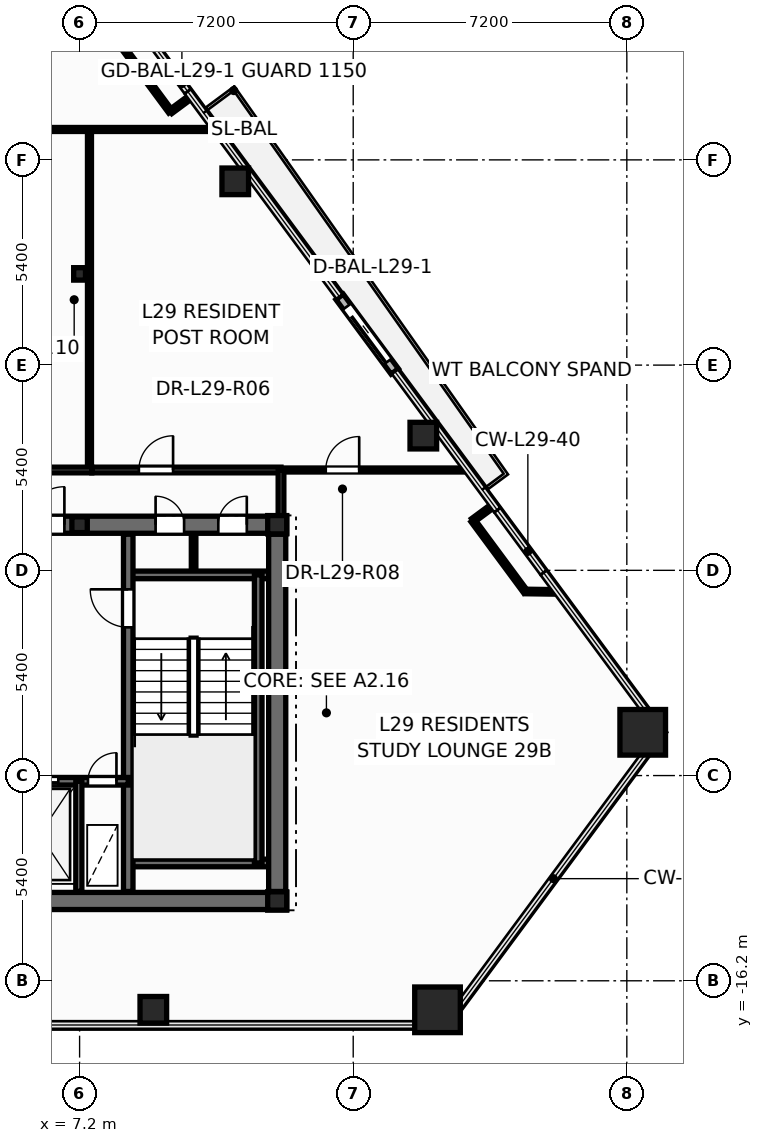
"""IFC4 building model, lengths in metres.
Left out: names, types, materials, properties, quantities, classifications, styles, units other than length and angle.
Written with IfcOpenShell. Run it as: python <this file> out.ifc"""

import sys

from ifc_helpers import new_model, si_unit, direction, frame, frame_2d, origin, origin_2d, place, context, subcontext, project, spatial, rectangle, hollow_rectangle, hollow_circle, i_section, extrude, element, fill, save


model = new_model("IFC4")
c1 = context("Model", 3, precision=1e-05, world=origin(), true_north=direction((0.0, 1.0)))
c2 = subcontext(c1, "Body", "Model", "MODEL_VIEW")
j1 = project(units=[si_unit("LENGTHUNIT", "METRE"), si_unit("PLANEANGLEUNIT", "RADIAN")], contexts=[c1])
p1 = place(None, origin())
s1 = spatial("IfcSite", under=j1, at=p1, CompositionType="ELEMENT")
p2 = place(p1, origin())
s2 = spatial("IfcBuilding", under=s1, at=p2, CompositionType="ELEMENT")
p3 = place(p2, frame((0.0, 0.0, 114.0)))
s3 = spatial("IfcBuildingStorey", under=s2, at=p3, CompositionType="ELEMENT", Elevation=114.0)
for number, where, z_axis, x_axis in (
    (1, (16.618, -16.963, 0.0), (0.0, 0.0, 1.0), (1.0, 0.0, 0.0)),
    (2, (22.019, -9.662, 0.0), (0.0, 0.0, 1.0), (1.0, 0.0, 0.0)),
):
    element("IfcColumn", number, at=place(p3, frame(where, z_axis=z_axis, x_axis=x_axis)), inside=s3, PredefinedType="COLUMN", context=c2, shape_type="SweptSolid", body=[
        extrude(hollow_rectangle(XDim=1.2, YDim=1.2, WallThickness=0.055, at=origin_2d()), origin(), (0.0, 0.0, 1.0), 3.6),
    ])
for number, where, z_axis, x_axis in (
    (3, (9.14, -16.963, 0.0), (0.0, 0.0, 1.0), (1.0, 0.0, 0.0)),
    (4, (16.245, -1.856, 0.0), (0.0, 0.0, 1.0), (1.0, 0.0, 0.0)),
    (5, (11.296, 4.836, 0.0), (0.0, 0.0, 1.0), (1.0, 0.0, 0.0)),
):
    element("IfcColumn", number, at=place(p3, frame(where, z_axis=z_axis, x_axis=x_axis)), inside=s3, PredefinedType="COLUMN", context=c2, shape_type="SweptSolid", body=[
        extrude(hollow_circle(Radius=0.35, WallThickness=0.03, at=origin_2d()), origin(), (0.0, 0.0, 1.0), 3.6),
    ])
for number, where, z_axis, x_axis in (
    (6, (12.4, -14.1, 0.0), (0.0, 0.0, 1.0), (1.0, 0.0, 0.0)),
    (7, (12.4, -4.2, 0.0), (0.0, 0.0, 1.0), (1.0, 0.0, 0.0)),
):
    element("IfcColumn", number, at=place(p3, frame(where, z_axis=z_axis, x_axis=x_axis)), inside=s3, PredefinedType="COLUMN", context=c2, shape_type="SweptSolid", body=[
        extrude(i_section(OverallWidth=0.5, OverallDepth=0.482, WebThickness=0.04, FlangeThickness=0.045, at=origin_2d()), origin(), (0.0, 0.0, 1.0), 3.6),
    ])
p4 = place(p3, frame((7.2, -4.2, 0.0), z_axis=(0.0, 0.0, 1.0), x_axis=(1.0, 0.0, 0.0)))
e8 = element("IfcColumn", 8, at=p4, inside=s3, PredefinedType="PILASTER", context=c2, shape_type="SweptSolid", body=[
    extrude(i_section(OverallWidth=0.405, OverallDepth=0.414, WebThickness=0.022, FlangeThickness=0.032, at=origin_2d()), origin(), (0.0, 0.0, 1.0), 3.6),
])
p5 = place(p3, frame((7.2, 2.4, 0.0), z_axis=(0.0, 0.0, 1.0), x_axis=(1.0, 0.0, 0.0)))
e9 = element("IfcColumn", 9, at=p5, inside=s3, PredefinedType="COLUMN", context=c2, shape_type="SweptSolid", body=[
    extrude(i_section(OverallWidth=0.311, OverallDepth=0.327, WebThickness=0.016, FlangeThickness=0.025, at=origin_2d()), origin(), (0.0, 0.0, 1.0), 3.6),
])
p6 = place(p3, frame((15.493, -0.166, -0.015), z_axis=(0.0, 0.0, 1.0), x_axis=(-0.594655490218, 0.803980626603, 0.0)))
e10 = element("IfcWall", 10, at=p6, inside=s3, PredefinedType="STANDARD", context=c2, shape_type="SweptSolid", body=[
    extrude(rectangle(XDim=2.44, YDim=0.24, at=frame_2d((1.22, 0.0))), origin(), (0.0, 0.0, 1.0), 2.777),
])
p7 = place(p6, frame((0.32, 0.0, 0.015)))
e11 = element("IfcOpeningElement", 11, at=p7, cuts=e10, PredefinedType="OPENING", context=c2, shape_type="SweptSolid", body=[
    extrude(rectangle(XDim=1.806, YDim=2.204, at=frame_2d((0.9, 1.102))), frame((0.0, 0.13, 0.0), z_axis=(0.0, -1.0, 0.0), x_axis=(1.0, 0.0, 0.0)), (0.0, 0.0, 1.0), 0.26),
])
p8 = place(p3, frame((10.2, -5.52, 0.0), z_axis=(0.0, 0.0, 1.0), x_axis=(0.0, 1.0, 0.0)))
e12 = element("IfcWall", 12, at=p8, inside=s3, PredefinedType="PARTITIONING", context=c2, shape_type="SweptSolid", body=[
    extrude(rectangle(XDim=1.12, YDim=0.12, at=frame_2d((0.56, 0.0))), origin(), (0.0, 0.0, 1.0), 3.32),
])
p9 = place(p3, frame((-12.65, -14.1, 0.0), z_axis=(0.0, 0.0, 1.0), x_axis=(1.0, 0.0, 0.0)))
e13 = element("IfcWall", 13, at=p9, inside=s3, PredefinedType="SHEAR", context=c2, shape_type="SweptSolid", body=[
    extrude(rectangle(XDim=25.3, YDim=0.45, at=frame_2d((12.65, 0.0))), origin(), (0.0, 0.0, 1.0), 3.6),
])
p10 = place(p3, frame((-12.65, -4.2, 0.0), z_axis=(0.0, 0.0, 1.0), x_axis=(1.0, 0.0, 0.0)))
e14 = element("IfcWall", 14, at=p10, inside=s3, PredefinedType="SHEAR", context=c2, shape_type="SweptSolid", body=[
    extrude(rectangle(XDim=25.3, YDim=0.45, at=frame_2d((12.65, 0.0))), origin(), (0.0, 0.0, 1.0), 3.6),
])
p11 = place(p10, frame((0.95, 0.0, 0.0)))
e15 = element("IfcOpeningElement", 15, at=p11, cuts=e14, PredefinedType="OPENING", context=c2, shape_type="SweptSolid", body=[
    extrude(rectangle(XDim=0.756, YDim=2.054, at=frame_2d((0.375, 1.027))), frame((0.0, 0.235, 0.0), z_axis=(0.0, -1.0, 0.0), x_axis=(1.0, 0.0, 0.0)), (0.0, 0.0, 1.0), 0.47),
])
p12 = place(p10, frame((2.6, 0.0, 0.0)))
e16 = element("IfcOpeningElement", 16, at=p12, cuts=e14, PredefinedType="OPENING", context=c2, shape_type="SweptSolid", body=[
    extrude(rectangle(XDim=0.756, YDim=2.054, at=frame_2d((0.375, 1.027))), frame((0.0, 0.235, 0.0), z_axis=(0.0, -1.0, 0.0), x_axis=(1.0, 0.0, 0.0)), (0.0, 0.0, 1.0), 0.47),
])
p13 = place(p10, frame((21.85, 0.0, 0.0)))
e17 = element("IfcOpeningElement", 17, at=p13, cuts=e14, PredefinedType="OPENING", context=c2, shape_type="SweptSolid", body=[
    extrude(rectangle(XDim=0.756, YDim=2.054, at=frame_2d((0.375, 1.027))), frame((0.0, 0.235, 0.0), z_axis=(0.0, -1.0, 0.0), x_axis=(1.0, 0.0, 0.0)), (0.0, 0.0, 1.0), 0.47),
])
p14 = place(p10, frame((23.5, 0.0, 0.0)))
e18 = element("IfcOpeningElement", 18, at=p14, cuts=e14, PredefinedType="OPENING", context=c2, shape_type="SweptSolid", body=[
    extrude(rectangle(XDim=0.756, YDim=2.054, at=frame_2d((0.375, 1.027))), frame((0.0, 0.235, 0.0), z_axis=(0.0, -1.0, 0.0), x_axis=(1.0, 0.0, 0.0)), (0.0, 0.0, 1.0), 0.47),
])
p15 = place(p10, frame((5.85, 0.0, 0.0)))
e19 = element("IfcOpeningElement", 19, at=p15, cuts=e14, PredefinedType="OPENING", context=c2, shape_type="SweptSolid", body=[
    extrude(rectangle(XDim=1.006, YDim=2.104, at=frame_2d((0.5, 1.052))), frame((0.0, 0.235, 0.0), z_axis=(0.0, -1.0, 0.0), x_axis=(1.0, 0.0, 0.0)), (0.0, 0.0, 1.0), 0.47),
])
p16 = place(p10, frame((10.35, 0.0, 0.0)))
e20 = element("IfcOpeningElement", 20, at=p16, cuts=e14, PredefinedType="OPENING", context=c2, shape_type="SweptSolid", body=[
    extrude(rectangle(XDim=1.406, YDim=2.154, at=frame_2d((0.7, 1.077))), frame((0.0, 0.235, 0.0), z_axis=(0.0, -1.0, 0.0), x_axis=(1.0, 0.0, 0.0)), (0.0, 0.0, 1.0), 0.47),
])
p17 = place(p10, frame((18.45, 0.0, 0.0)))
e21 = element("IfcOpeningElement", 21, at=p17, cuts=e14, PredefinedType="OPENING", context=c2, shape_type="SweptSolid", body=[
    extrude(rectangle(XDim=1.006, YDim=2.104, at=frame_2d((0.5, 1.052))), frame((0.0, 0.235, 0.0), z_axis=(0.0, -1.0, 0.0), x_axis=(1.0, 0.0, 0.0)), (0.0, 0.0, 1.0), 0.47),
])
for number, where, z_axis, x_axis in (
    (22, (8.48, -5.52, 0.0), (0.0, 0.0, 1.0), (1.0, 0.0, 0.0)),
    (23, (8.48, -13.1, 0.0), (0.0, 0.0, 1.0), (1.0, 0.0, 0.0)),
):
    element("IfcWall", number, at=place(p3, frame(where, z_axis=z_axis, x_axis=x_axis)), inside=s3, PredefinedType="SOLIDWALL", context=c2, shape_type="SweptSolid", body=[
        extrude(rectangle(XDim=3.87, YDim=0.2, at=frame_2d((1.935, 0.0))), origin(), (0.0, 0.0, 1.0), 3.6),
    ])
p18 = place(p3, frame((11.9, -13.1, 0.0), z_axis=(0.0, 0.0, 1.0), x_axis=(0.0, 1.0, 0.0)))
e24 = element("IfcWall", 24, at=p18, inside=s3, PredefinedType="SOLIDWALL", context=c2, shape_type="SweptSolid", body=[
    extrude(rectangle(XDim=7.58, YDim=0.2, at=frame_2d((3.79, 0.0))), origin(), (0.0, 0.0, 1.0), 3.6),
])
p19 = place(p3, frame((8.48, -13.85, 0.0), z_axis=(0.0, 0.0, 1.0), x_axis=(0.0, 1.0, 0.0)))
e25 = element("IfcWall", 25, at=p19, inside=s3, PredefinedType="SHEAR", context=c2, shape_type="SweptSolid", body=[
    extrude(rectangle(XDim=9.4, YDim=0.25, at=frame_2d((4.7, 0.0))), origin(), (0.0, 0.0, 1.0), 3.6),
])
p20 = place(p19, frame((6.95, 0.0, 0.0)))
e26 = element("IfcOpeningElement", 26, at=p20, cuts=e25, PredefinedType="OPENING", context=c2, shape_type="SweptSolid", body=[
    extrude(rectangle(XDim=1.006, YDim=2.104, at=frame_2d((0.5, 1.052))), frame((0.0, 0.135, 0.0), z_axis=(0.0, -1.0, 0.0), x_axis=(1.0, 0.0, 0.0)), (0.0, 0.0, 1.0), 0.27),
])
p21 = place(p3, frame((5.12, -10.95, 0.0), z_axis=(0.0, 0.0, 1.0), x_axis=(1.0, 0.0, 0.0)))
e27 = element("IfcWall", 27, at=p21, inside=s3, PredefinedType="SOLIDWALL", context=c2, shape_type="SweptSolid", body=[
    extrude(rectangle(XDim=3.36, YDim=0.2, at=frame_2d((1.68, 0.0))), origin(), (0.0, 0.0, 1.0), 3.6),
])
p22 = place(p21, frame((0.42, 0.0, 0.0)))
e28 = element("IfcOpeningElement", 28, at=p22, cuts=e27, PredefinedType="OPENING", context=c2, shape_type="SweptSolid", body=[
    extrude(rectangle(XDim=1.106, YDim=2.104, at=frame_2d((0.55, 1.052))), frame((0.0, 0.11, 0.0), z_axis=(0.0, -1.0, 0.0), x_axis=(1.0, 0.0, 0.0)), (0.0, 0.0, 1.0), 0.22),
])
p23 = place(p21, frame((2.3, 0.0, 0.0)))
e29 = element("IfcOpeningElement", 29, at=p23, cuts=e27, PredefinedType="OPENING", context=c2, shape_type="SweptSolid", body=[
    extrude(rectangle(XDim=0.756, YDim=2.054, at=frame_2d((0.375, 1.027))), frame((0.0, 0.11, 0.0), z_axis=(0.0, -1.0, 0.0), x_axis=(1.0, 0.0, 0.0)), (0.0, 0.0, 1.0), 0.22),
])
p24 = place(p3, frame((7.18, -13.85, 0.0), z_axis=(0.0, 0.0, 1.0), x_axis=(0.0, 1.0, 0.0)))
e30 = element("IfcWall", 30, at=p24, inside=s3, PredefinedType="PARTITIONING", context=c2, shape_type="SweptSolid", body=[
    extrude(rectangle(XDim=2.9, YDim=0.16, at=frame_2d((1.45, 0.0))), origin(), (0.0, 0.0, 1.0), 2.345),
])
p25 = place(p3, frame((12.4, -13.85, 0.0), z_axis=(0.0, 0.0, 1.0), x_axis=(0.0, 1.0, 0.0)))
e31 = element("IfcWall", 31, at=p25, inside=s3, PredefinedType="SHEAR", context=c2, shape_type="SweptSolid", body=[
    extrude(rectangle(XDim=9.4, YDim=0.45, at=frame_2d((4.7, 0.0))), origin(), (0.0, 0.0, 1.0), 3.6),
])
p26 = place(p3, frame((7.46, -2.76, 0.0), z_axis=(0.0, 0.0, 1.0), x_axis=(0.0, 1.0, 0.0)))
e32 = element("IfcWall", 32, at=p26, inside=s3, PredefinedType="PARTITIONING", context=c2, shape_type="SweptSolid", body=[
    extrude(rectangle(XDim=8.96, YDim=0.105, at=frame_2d((4.48, 0.0))), origin(), (0.0, 0.0, 1.0), 2.295),
])
p27 = place(p3, frame((2.36, -2.76, 0.0), z_axis=(0.0, 0.0, 1.0), x_axis=(1.0, 0.0, 0.0)))
e33 = element("IfcWall", 33, at=p27, inside=s3, PredefinedType="PARTITIONING", context=c2, shape_type="SweptSolid", body=[
    extrude(rectangle(XDim=5.16, YDim=0.15, at=frame_2d((2.58, 0.0))), origin(), (0.0, 0.0, 1.0), 2.295),
])
p28 = place(p3, frame((2.36, 6.2, 0.0), z_axis=(0.0, 0.0, 1.0), x_axis=(1.0, 0.0, 0.0)))
e34 = element("IfcWall", 34, at=p28, inside=s3, PredefinedType="PARTITIONING", context=c2, shape_type="SweptSolid", body=[
    extrude(rectangle(XDim=8.424, YDim=0.105, at=frame_2d((4.212, 0.0))), origin(), (0.0, 0.0, 1.0), 2.587),
])
p29 = place(p3, frame((7.522, -2.76, 0.0), z_axis=(0.0, 0.0, 1.0), x_axis=(1.0, 0.0, 0.0)))
e35 = element("IfcWall", 35, at=p29, inside=s3, PredefinedType="PARTITIONING", context=c2, shape_type="SweptSolid", body=[
    extrude(rectangle(XDim=4.978, YDim=0.15, at=frame_2d((2.489, 0.0))), origin(), (0.0, 0.0, 1.0), 3.32),
])
p30 = place(p29, frame((1.238, 0.0, 0.0)))
e36 = element("IfcOpeningElement", 36, at=p30, cuts=e35, PredefinedType="OPENING", context=c2, shape_type="SweptSolid", body=[
    extrude(rectangle(XDim=0.906, YDim=2.104, at=frame_2d((0.45, 1.052))), frame((0.0, 0.085, 0.0), z_axis=(0.0, -1.0, 0.0), x_axis=(1.0, 0.0, 0.0)), (0.0, 0.0, 1.0), 0.17),
])
p31 = place(p3, frame((12.44, -2.76, 0.0), z_axis=(0.0, 0.0, 1.0), x_axis=(1.0, 0.0, 0.0)))
e37 = element("IfcWall", 37, at=p31, inside=s3, PredefinedType="PARTITIONING", context=c2, shape_type="SweptSolid", body=[
    extrude(rectangle(XDim=4.971, YDim=0.105, at=frame_2d((2.486, 0.0))), origin(), (0.0, 0.0, 1.0), 2.762),
])
p32 = place(p31, frame((1.238, 0.0, 0.0)))
e38 = element("IfcOpeningElement", 38, at=p32, cuts=e37, PredefinedType="OPENING", context=c2, shape_type="SweptSolid", body=[
    extrude(rectangle(XDim=0.886, YDim=2.104, at=frame_2d((0.44, 1.052))), frame((0.0, 0.062, 0.0), z_axis=(0.0, -1.0, 0.0), x_axis=(1.0, 0.0, 0.0)), (0.0, 0.0, 1.0), 0.125),
])
p33 = place(p3, frame((9.593, 6.667, 0.0), z_axis=(0.0, 0.0, 1.0), x_axis=(-0.59468950564, 0.803955466355, 0.0)))
e39 = element("IfcWall", 39, at=p33, inside=s3, PredefinedType="PARTITIONING", context=c2, shape_type="SweptSolid", body=[
    extrude(rectangle(XDim=2.323, YDim=0.12, at=frame_2d((1.161, 0.0))), origin(), (0.0, 0.0, 1.0), 3.32),
])
p34 = place(p3, frame((18.93, -5.956, 0.0), z_axis=(0.0, 0.0, 1.0), x_axis=(-0.594707185977, 0.803942387829, 0.0)))
e40 = element("IfcWall", 40, at=p34, inside=s3, PredefinedType="PARTITIONING", context=c2, shape_type="SweptSolid", body=[
    extrude(rectangle(XDim=2.323, YDim=0.12, at=frame_2d((1.162, 0.0))), origin(), (0.0, 0.0, 1.0), 3.32),
])
p35 = place(p3, frame((12.5, -4.24, 0.0), z_axis=(0.0, 0.0, 1.0), x_axis=(0.0, 1.0, 0.0)))
e41 = element("IfcWall", 41, at=p35, inside=s3, PredefinedType="PARTITIONING", context=c2, shape_type="SweptSolid", body=[
    extrude(rectangle(XDim=1.48, YDim=0.15, at=frame_2d((0.74, 0.0))), origin(), (0.0, 0.0, 1.0), 2.295),
])
p36 = place(p3, frame((19.771, -5.968, 0.0), z_axis=(0.0, 0.0, 1.0), x_axis=(-0.999903115379, 0.013919764947, 0.0)))
e42 = element("IfcWall", 42, at=p36, inside=s3, PredefinedType="PARTITIONING", context=c2, shape_type="SweptSolid", body=[
    extrude(rectangle(XDim=0.842, YDim=0.12, at=frame_2d((0.421, 0.0))), origin(), (0.0, 0.0, 1.0), 2.762),
])
p37 = place(p3, frame((17.548, -4.089, 0.0), z_axis=(0.0, 0.0, 1.0), x_axis=(0.804047409182, 0.594565188847, 0.0)))
e43 = element("IfcWall", 43, at=p37, inside=s3, PredefinedType="PARTITIONING", context=c2, shape_type="SweptSolid", body=[
    extrude(rectangle(XDim=0.67, YDim=0.12, at=frame_2d((0.335, 0.0))), origin(), (0.0, 0.0, 1.0), 2.762),
])
p38 = place(p3, frame((10.132, 7.066, 0.0), z_axis=(0.0, 0.0, 1.0), x_axis=(-0.803918563719, -0.594739390748, 0.0)))
e44 = element("IfcWall", 44, at=p38, inside=s3, PredefinedType="PARTITIONING", context=c2, shape_type="SweptSolid", body=[
    extrude(rectangle(XDim=0.67, YDim=0.12, at=frame_2d((0.335, 0.0))), origin(), (0.0, 0.0, 1.0), 2.762),
])
p39 = place(p7, origin())
e45 = element("IfcDoor", 45, at=p39, inside=s3, OperationType="SLIDING_TO_LEFT", PredefinedType="DOOR", context=c2, shape_type="SweptSolid", body=[
    extrude(rectangle(XDim=1.8, YDim=2.2, at=frame_2d((0.9, 1.1))), frame((0.0, 0.025, 0.0), z_axis=(0.0, -1.0, 0.0), x_axis=(1.0, 0.0, 0.0)), (0.0, 0.0, 1.0), 0.05),
])
fill(e11, e45)
p40 = place(p20, origin())
e46 = element("IfcDoor", 46, at=p40, inside=s3, OperationType="SINGLE_SWING_RIGHT", PredefinedType="DOOR", context=c2, shape_type="SweptSolid", body=[
    extrude(rectangle(XDim=1.0, YDim=2.1, at=frame_2d((0.5, 1.05))), frame((0.0, 0.025, 0.0), z_axis=(0.0, -1.0, 0.0), x_axis=(1.0, 0.0, 0.0)), (0.0, 0.0, 1.0), 0.05),
])
fill(e26, e46)
p41 = place(p22, origin())
e47 = element("IfcDoor", 47, at=p41, inside=s3, OperationType="DOUBLE_DOOR_SLIDING", PredefinedType="DOOR", context=c2, shape_type="SweptSolid", body=[
    extrude(rectangle(XDim=1.1, YDim=2.1, at=frame_2d((0.55, 1.05))), frame((0.0, 0.025, 0.0), z_axis=(0.0, -1.0, 0.0), x_axis=(1.0, 0.0, 0.0)), (0.0, 0.0, 1.0), 0.05),
])
fill(e28, e47)
p42 = place(p23, origin())
e48 = element("IfcDoor", 48, at=p42, inside=s3, OperationType="SINGLE_SWING_RIGHT", PredefinedType="DOOR", context=c2, shape_type="SweptSolid", body=[
    extrude(rectangle(XDim=0.75, YDim=2.05, at=frame_2d((0.375, 1.025))), frame((0.0, 0.025, 0.0), z_axis=(0.0, -1.0, 0.0), x_axis=(1.0, 0.0, 0.0)), (0.0, 0.0, 1.0), 0.05),
])
fill(e29, e48)
p43 = place(p13, origin())
e49 = element("IfcDoor", 49, at=p43, inside=s3, OperationType="SINGLE_SWING_LEFT", PredefinedType="DOOR", context=c2, shape_type="SweptSolid", body=[
    extrude(rectangle(XDim=0.75, YDim=2.05, at=frame_2d((0.375, 1.025))), frame((0.0, 0.025, 0.0), z_axis=(0.0, -1.0, 0.0), x_axis=(1.0, 0.0, 0.0)), (0.0, 0.0, 1.0), 0.05),
])
fill(e17, e49)
p44 = place(p14, origin())
e50 = element("IfcDoor", 50, at=p44, inside=s3, OperationType="SINGLE_SWING_RIGHT", PredefinedType="DOOR", context=c2, shape_type="SweptSolid", body=[
    extrude(rectangle(XDim=0.75, YDim=2.05, at=frame_2d((0.375, 1.025))), frame((0.0, 0.025, 0.0), z_axis=(0.0, -1.0, 0.0), x_axis=(1.0, 0.0, 0.0)), (0.0, 0.0, 1.0), 0.05),
])
fill(e18, e50)
p45 = place(p17, origin())
e51 = element("IfcDoor", 51, at=p45, inside=s3, OperationType="SINGLE_SWING_RIGHT", PredefinedType="DOOR", context=c2, shape_type="SweptSolid", body=[
    extrude(rectangle(XDim=1.0, YDim=2.1, at=frame_2d((0.5, 1.05))), frame((0.0, 0.025, 0.0), z_axis=(0.0, -1.0, 0.0), x_axis=(1.0, 0.0, 0.0)), (0.0, 0.0, 1.0), 0.05),
])
fill(e21, e51)
p46 = place(p30, origin())
e52 = element("IfcDoor", 52, at=p46, inside=s3, OperationType="SINGLE_SWING_RIGHT", PredefinedType="DOOR", context=c2, shape_type="SweptSolid", body=[
    extrude(rectangle(XDim=0.9, YDim=2.1, at=frame_2d((0.45, 1.05))), frame((0.0, 0.025, 0.0), z_axis=(0.0, -1.0, 0.0), x_axis=(1.0, 0.0, 0.0)), (0.0, 0.0, 1.0), 0.05),
])
fill(e36, e52)
p47 = place(p32, origin())
e53 = element("IfcDoor", 53, at=p47, inside=s3, OperationType="SINGLE_SWING_RIGHT", PredefinedType="DOOR", context=c2, shape_type="SweptSolid", body=[
    extrude(rectangle(XDim=0.88, YDim=2.1, at=frame_2d((0.44, 1.05))), frame((0.0, 0.025, 0.0), z_axis=(0.0, -1.0, 0.0), x_axis=(1.0, 0.0, 0.0)), (0.0, 0.0, 1.0), 0.05),
])
fill(e38, e53)
save(model, sys.argv[1])
